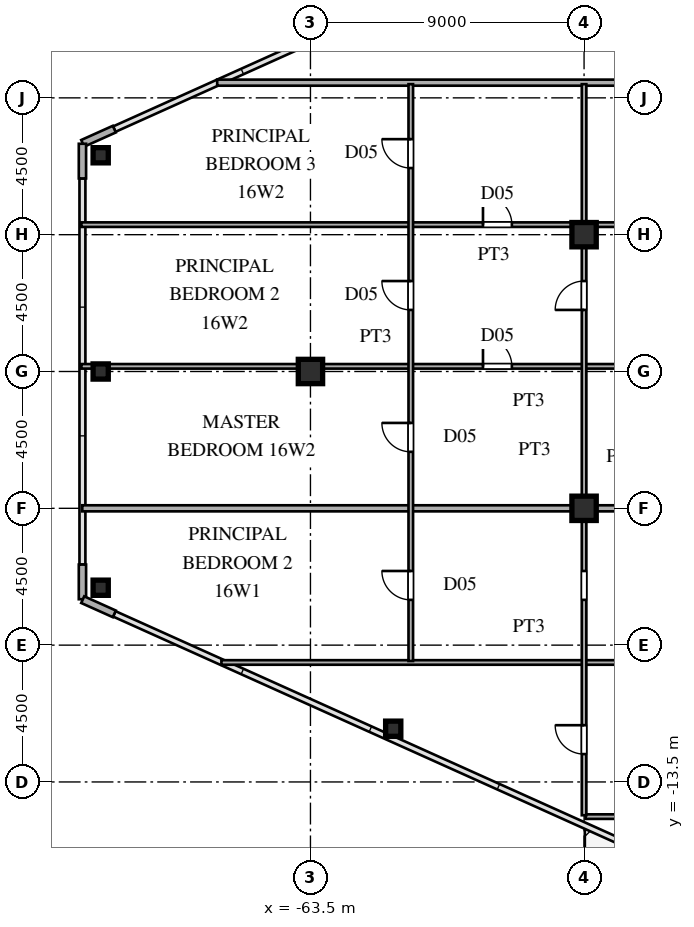
"""IFC4 building model, lengths in metres.
Left out: names, types, materials, properties, quantities, classifications, styles, units other than length and angle.
Written with IfcOpenShell. Run it as: python <this file> out.ifc"""

import sys

from ifc_helpers import new_model, si_unit, direction, frame, frame_2d, origin, origin_2d, place, context, subcontext, project, spatial, rectangle, hollow_rectangle, i_section, extrude, source, transform, mapped, element, fill, save


model = new_model("IFC4")
c1 = context("Model", 3, precision=1e-05, world=origin(), true_north=direction((0.0, 1.0)))
c2 = subcontext(c1, "Body", "Model", "MODEL_VIEW")
j1 = project(units=[si_unit("LENGTHUNIT", "METRE"), si_unit("PLANEANGLEUNIT", "RADIAN")], contexts=[c1])
p1 = place(None, origin())
s1 = spatial("IfcSite", under=j1, at=p1, CompositionType="ELEMENT")
p2 = place(p1, origin())
s2 = spatial("IfcBuilding", under=s1, at=p2, CompositionType="ELEMENT")
p3 = place(p2, frame((0.0, 0.0, 62.1)))
s3 = spatial("IfcBuildingStorey", under=s2, at=p3, CompositionType="ELEMENT", Elevation=62.1)
m1 = source(origin(), c2, "Body", "SweptSolid", [
    extrude(i_section(OverallWidth=0.8, OverallDepth=0.8, WebThickness=0.032, FlangeThickness=0.05, at=origin_2d()), origin(), (0.0, 0.0, 1.0), 3.6),
])
for number, where, z_axis, x_axis in (
    (1, (-54.5, -4.5, 0.0), (0.0, 0.0, 1.0), (1.0, 0.0, 0.0)),
    (2, (-54.5, 4.5, 0.0), (0.0, 0.0, 1.0), (1.0, 0.0, 0.0)),
    (3, (-63.5, 0.0, 0.0), (0.0, 0.0, 1.0), (1.0, 0.0, 0.0)),
):
    element("IfcColumn", number, at=place(p3, frame(where, z_axis=z_axis, x_axis=x_axis)), inside=s3, PredefinedType="COLUMN", context=c2, shape_type="MappedRepresentation", body=[
        mapped(m1, transform((0.0, 0.0, 0.0), scale=1.0)),
    ])
m2 = source(origin(), c2, "Body", "SweptSolid", [
    extrude(hollow_rectangle(XDim=0.5, YDim=0.5, WallThickness=0.02, at=origin_2d()), origin(), (0.0, 0.0, 1.0), 3.6),
])
for number, where, z_axis, x_axis in (
    (4, (-70.4, 7.112, 0.0), (0.0, 0.0, 1.0), (1.0, 0.0, 0.0)),
    (5, (-70.4, -7.112, 0.0), (0.0, 0.0, 1.0), (1.0, 0.0, 0.0)),
    (6, (-60.778, -11.749, 0.0), (0.0, 0.0, 1.0), (1.0, 0.0, 0.0)),
    (7, (-70.4, 0.0, 0.0), (0.0, 0.0, 1.0), (1.0, 0.0, 0.0)),
):
    element("IfcColumn", number, at=place(p3, frame(where, z_axis=z_axis, x_axis=x_axis)), inside=s3, PredefinedType="COLUMN", context=c2, shape_type="MappedRepresentation", body=[
        mapped(m2, transform((0.0, 0.0, 0.0), scale=1.0)),
    ])
for number, where, z_axis, x_axis in (
    (8, (-69.951, 7.972, 0.0), (0.0, 0.0, 1.0), (-0.912, -0.41, 0.0)),
    (9, (-71.0, 7.49, 0.0), (0.0, 0.0, 1.0), (0.0, -1.0, 0.0)),
    (10, (-71.0, -6.35, 0.0), (0.0, 0.0, 1.0), (0.0, -1.0, 0.0)),
    (11, (-70.991, -7.504, 0.0), (0.0, 0.0, 1.0), (0.912, -0.41, 0.0)),
):
    element("IfcWall", number, at=place(p3, frame(where, z_axis=z_axis, x_axis=x_axis)), inside=s3, PredefinedType="SOLIDWALL", context=c2, shape_type="SweptSolid", body=[
        extrude(rectangle(XDim=1.14, YDim=0.24, at=frame_2d((0.57, 0.0))), origin(), (0.0, 0.0, 1.0), 3.38),
    ])
p4 = place(p3, frame((-54.45, -14.64, 0.0), z_axis=(0.0, 0.0, 1.0), x_axis=(1.0, 0.0, 0.0)))
e12 = element("IfcWall", 12, at=p4, inside=s3, PredefinedType="PARTITIONING", context=c2, shape_type="SweptSolid", body=[
    extrude(rectangle(XDim=10.55, YDim=0.15, at=frame_2d((5.275, 0.0))), origin(), (0.0, 0.0, 1.0), 3.38),
])
p5 = place(p4, frame((4.8, 0.0, 0.0)))
e13 = element("IfcOpeningElement", 13, at=p5, cuts=e12, PredefinedType="OPENING", context=c2, shape_type="SweptSolid", body=[
    extrude(rectangle(XDim=0.95, YDim=2.15, at=frame_2d((0.475, 1.075))), frame((0.0, 0.085, 0.0), z_axis=(0.0, -1.0, 0.0), x_axis=(1.0, 0.0, 0.0)), (0.0, 0.0, 1.0), 0.17),
])
p6 = place(p3, frame((-66.429, -9.57, 0.0), z_axis=(0.0, 0.0, 1.0), x_axis=(1.0, 0.0, 0.0)))
e14 = element("IfcWall", 14, at=p6, inside=s3, PredefinedType="PARTITIONING", context=c2, shape_type="SweptSolid", body=[
    extrude(rectangle(XDim=22.529, YDim=0.15, at=frame_2d((11.265, 0.0))), origin(), (0.0, 0.0, 1.0), 3.38),
])
p7 = place(p6, frame((16.779, 0.0, 0.0)))
e15 = element("IfcOpeningElement", 15, at=p7, cuts=e14, PredefinedType="OPENING", context=c2, shape_type="SweptSolid", body=[
    extrude(rectangle(XDim=0.95, YDim=2.15, at=frame_2d((0.475, 1.075))), frame((0.0, 0.085, 0.0), z_axis=(0.0, -1.0, 0.0), x_axis=(1.0, 0.0, 0.0)), (0.0, 0.0, 1.0), 0.17),
])
p8 = place(p3, frame((-71.005, -4.5, 0.0), z_axis=(0.0, 0.0, 1.0), x_axis=(1.0, 0.0, 0.0)))
e16 = element("IfcWall", 16, at=p8, inside=s3, PredefinedType="PARTITIONING", context=c2, shape_type="SweptSolid", body=[
    extrude(rectangle(XDim=16.485, YDim=0.2, at=frame_2d((8.242, 0.0))), origin(), (0.0, 0.0, 1.0), 3.38),
])
p9 = place(p3, frame((-54.52, -4.5, 0.0), z_axis=(0.0, 0.0, 1.0), x_axis=(1.0, 0.0, 0.0)))
e17 = element("IfcWall", 17, at=p9, inside=s3, PredefinedType="PARTITIONING", context=c2, shape_type="SweptSolid", body=[
    extrude(rectangle(XDim=15.69, YDim=0.2, at=frame_2d((7.845, 0.0))), origin(), (0.0, 0.0, 1.0), 2.68),
])
p10 = place(p3, frame((-71.035, 0.17, 0.0), z_axis=(0.0, 0.0, 1.0), x_axis=(1.0, 0.0, 0.0)))
e18 = element("IfcWall", 18, at=p10, inside=s3, PredefinedType="PARTITIONING", context=c2, shape_type="SweptSolid", body=[
    extrude(rectangle(XDim=27.135, YDim=0.15, at=frame_2d((13.567, 0.0))), origin(), (0.0, 0.0, 1.0), 3.38),
])
p11 = place(p10, frame((21.385, 0.0, 0.0)))
e19 = element("IfcOpeningElement", 19, at=p11, cuts=e18, PredefinedType="OPENING", context=c2, shape_type="SweptSolid", body=[
    extrude(rectangle(XDim=0.95, YDim=2.15, at=frame_2d((0.475, 1.075))), frame((0.0, 0.085, 0.0), z_axis=(0.0, -1.0, 0.0), x_axis=(1.0, 0.0, 0.0)), (0.0, 0.0, 1.0), 0.17),
])
p12 = place(p10, frame((13.21, 0.0, 0.0)))
e20 = element("IfcOpeningElement", 20, at=p12, cuts=e18, PredefinedType="OPENING", context=c2, shape_type="SweptSolid", body=[
    extrude(rectangle(XDim=0.95, YDim=2.15, at=frame_2d((0.475, 1.075))), frame((0.0, 0.085, 0.0), z_axis=(0.0, -1.0, 0.0), x_axis=(1.0, 0.0, 0.0)), (0.0, 0.0, 1.0), 0.17),
])
p13 = place(p3, frame((-71.035, 4.83, 0.0), z_axis=(0.0, 0.0, 1.0), x_axis=(1.0, 0.0, 0.0)))
e21 = element("IfcWall", 21, at=p13, inside=s3, PredefinedType="PARTITIONING", context=c2, shape_type="SweptSolid", body=[
    extrude(rectangle(XDim=27.135, YDim=0.15, at=frame_2d((13.567, 0.0))), origin(), (0.0, 0.0, 1.0), 3.38),
])
p14 = place(p13, frame((21.385, 0.0, 0.0)))
e22 = element("IfcOpeningElement", 22, at=p14, cuts=e21, PredefinedType="OPENING", context=c2, shape_type="SweptSolid", body=[
    extrude(rectangle(XDim=0.95, YDim=2.15, at=frame_2d((0.475, 1.075))), frame((0.0, 0.085, 0.0), z_axis=(0.0, -1.0, 0.0), x_axis=(1.0, 0.0, 0.0)), (0.0, 0.0, 1.0), 0.17),
])
p15 = place(p13, frame((13.21, 0.0, 0.0)))
e23 = element("IfcOpeningElement", 23, at=p15, cuts=e21, PredefinedType="OPENING", context=c2, shape_type="SweptSolid", body=[
    extrude(rectangle(XDim=0.95, YDim=2.15, at=frame_2d((0.475, 1.075))), frame((0.0, 0.085, 0.0), z_axis=(0.0, -1.0, 0.0), x_axis=(1.0, 0.0, 0.0)), (0.0, 0.0, 1.0), 0.17),
])
p16 = place(p3, frame((-66.568, 9.5, 0.0), z_axis=(0.0, 0.0, 1.0), x_axis=(1.0, 0.0, 0.0)))
e24 = element("IfcWall", 24, at=p16, inside=s3, PredefinedType="PARTITIONING", context=c2, shape_type="SweptSolid", body=[
    extrude(rectangle(XDim=27.738, YDim=0.2, at=frame_2d((13.869, 0.0))), origin(), (0.0, 0.0, 1.0), 3.38),
])
p17 = place(p3, frame((-60.2, -9.522, 0.0), z_axis=(0.0, 0.0, 1.0), x_axis=(0.0, 1.0, 0.0)))
e25 = element("IfcWall", 25, at=p17, inside=s3, PredefinedType="PARTITIONING", context=c2, shape_type="SweptSolid", body=[
    extrude(rectangle(XDim=18.972, YDim=0.15, at=frame_2d((9.486, 0.0))), origin(), (0.0, 0.0, 1.0), 3.38),
])
p18 = place(p17, frame((2.011, 0.0, 0.0)))
e26 = element("IfcOpeningElement", 26, at=p18, cuts=e25, PredefinedType="OPENING", context=c2, shape_type="SweptSolid", body=[
    extrude(rectangle(XDim=0.95, YDim=2.15, at=frame_2d((0.475, 1.075))), frame((0.0, 0.085, 0.0), z_axis=(0.0, -1.0, 0.0), x_axis=(1.0, 0.0, 0.0)), (0.0, 0.0, 1.0), 0.17),
])
p19 = place(p17, frame((6.88, 0.0, 0.0)))
e27 = element("IfcOpeningElement", 27, at=p19, cuts=e25, PredefinedType="OPENING", context=c2, shape_type="SweptSolid", body=[
    extrude(rectangle(XDim=0.95, YDim=2.15, at=frame_2d((0.475, 1.075))), frame((0.0, 0.085, 0.0), z_axis=(0.0, -1.0, 0.0), x_axis=(1.0, 0.0, 0.0)), (0.0, 0.0, 1.0), 0.17),
])
p20 = place(p17, frame((11.547, 0.0, 0.0)))
e28 = element("IfcOpeningElement", 28, at=p20, cuts=e25, PredefinedType="OPENING", context=c2, shape_type="SweptSolid", body=[
    extrude(rectangle(XDim=0.95, YDim=2.15, at=frame_2d((0.475, 1.075))), frame((0.0, 0.085, 0.0), z_axis=(0.0, -1.0, 0.0), x_axis=(1.0, 0.0, 0.0)), (0.0, 0.0, 1.0), 0.17),
])
p21 = place(p17, frame((16.214, 0.0, 0.0)))
e29 = element("IfcOpeningElement", 29, at=p21, cuts=e25, PredefinedType="OPENING", context=c2, shape_type="SweptSolid", body=[
    extrude(rectangle(XDim=0.95, YDim=2.15, at=frame_2d((0.475, 1.075))), frame((0.0, 0.085, 0.0), z_axis=(0.0, -1.0, 0.0), x_axis=(1.0, 0.0, 0.0)), (0.0, 0.0, 1.0), 0.17),
])
p22 = place(p3, frame((-54.5, -14.595, 0.0), z_axis=(0.0, 0.0, 1.0), x_axis=(0.0, 1.0, 0.0)))
e30 = element("IfcWall", 30, at=p22, inside=s3, PredefinedType="PARTITIONING", context=c2, shape_type="SweptSolid", body=[
    extrude(rectangle(XDim=24.045, YDim=0.15, at=frame_2d((12.022, 0.0))), origin(), (0.0, 0.0, 1.0), 2.68),
])
p23 = place(p22, frame((2.011, 0.0, 0.0)))
e31 = element("IfcOpeningElement", 31, at=p23, cuts=e30, PredefinedType="OPENING", context=c2, shape_type="SweptSolid", body=[
    extrude(rectangle(XDim=0.95, YDim=2.15, at=frame_2d((0.475, 1.075))), frame((0.0, 0.085, 0.0), z_axis=(0.0, -1.0, 0.0), x_axis=(1.0, 0.0, 0.0)), (0.0, 0.0, 1.0), 0.17),
])
p24 = place(p22, frame((7.084, 0.0, 0.0)))
e32 = element("IfcOpeningElement", 32, at=p24, cuts=e30, PredefinedType="OPENING", context=c2, shape_type="SweptSolid", body=[
    extrude(rectangle(XDim=0.95, YDim=2.15, at=frame_2d((0.475, 1.075))), frame((0.0, 0.085, 0.0), z_axis=(0.0, -1.0, 0.0), x_axis=(1.0, 0.0, 0.0)), (0.0, 0.0, 1.0), 0.17),
])
p25 = place(p22, frame((16.62, 0.0, 0.0)))
e33 = element("IfcOpeningElement", 33, at=p25, cuts=e30, PredefinedType="OPENING", context=c2, shape_type="SweptSolid", body=[
    extrude(rectangle(XDim=0.95, YDim=2.15, at=frame_2d((0.475, 1.075))), frame((0.0, 0.085, 0.0), z_axis=(0.0, -1.0, 0.0), x_axis=(1.0, 0.0, 0.0)), (0.0, 0.0, 1.0), 0.17),
])
m3 = source(origin(), c2, "Body", "SweptSolid", [
    extrude(rectangle(XDim=0.95, YDim=2.15, at=frame_2d((0.475, 1.075))), frame((0.0, 0.025, 0.0), z_axis=(0.0, -1.0, 0.0), x_axis=(1.0, 0.0, 0.0)), (0.0, 0.0, 1.0), 0.05),
])
p26 = place(p12, origin())
e34 = element("IfcDoor", 34, at=p26, inside=s3, OperationType="SINGLE_SWING_LEFT", PredefinedType="DOOR", context=c2, shape_type="MappedRepresentation", body=[
    mapped(m3, transform((0.0, 0.0, 0.0), scale=1.0)),
])
fill(e20, e34)
p27 = place(p15, origin())
e35 = element("IfcDoor", 35, at=p27, inside=s3, OperationType="SINGLE_SWING_LEFT", PredefinedType="DOOR", context=c2, shape_type="MappedRepresentation", body=[
    mapped(m3, transform((0.0, 0.0, 0.0), scale=1.0)),
])
fill(e23, e35)
p28 = place(p18, origin())
e36 = element("IfcDoor", 36, at=p28, inside=s3, OperationType="SINGLE_SWING_RIGHT", PredefinedType="DOOR", context=c2, shape_type="MappedRepresentation", body=[
    mapped(m3, transform((0.0, 0.0, 0.0), scale=1.0)),
])
fill(e26, e36)
p29 = place(p19, origin())
e37 = element("IfcDoor", 37, at=p29, inside=s3, OperationType="SINGLE_SWING_RIGHT", PredefinedType="DOOR", context=c2, shape_type="MappedRepresentation", body=[
    mapped(m3, transform((0.0, 0.0, 0.0), scale=1.0)),
])
fill(e27, e37)
p30 = place(p20, origin())
e38 = element("IfcDoor", 38, at=p30, inside=s3, OperationType="SINGLE_SWING_RIGHT", PredefinedType="DOOR", context=c2, shape_type="MappedRepresentation", body=[
    mapped(m3, transform((0.0, 0.0, 0.0), scale=1.0)),
])
fill(e28, e38)
p31 = place(p21, origin())
e39 = element("IfcDoor", 39, at=p31, inside=s3, OperationType="SINGLE_SWING_RIGHT", PredefinedType="DOOR", context=c2, shape_type="MappedRepresentation", body=[
    mapped(m3, transform((0.0, 0.0, 0.0), scale=1.0)),
])
fill(e29, e39)
p32 = place(p23, origin())
e40 = element("IfcDoor", 40, at=p32, inside=s3, OperationType="SINGLE_SWING_RIGHT", PredefinedType="DOOR", context=c2, shape_type="MappedRepresentation", body=[
    mapped(m3, transform((0.0, 0.0, 0.0), scale=1.0)),
])
fill(e31, e40)
p33 = place(p25, origin())
e41 = element("IfcDoor", 41, at=p33, inside=s3, OperationType="SINGLE_SWING_LEFT", PredefinedType="DOOR", context=c2, shape_type="MappedRepresentation", body=[
    mapped(m3, transform((0.0, 0.0, 0.0), scale=1.0)),
])
fill(e33, e41)
save(model, sys.argv[1])
